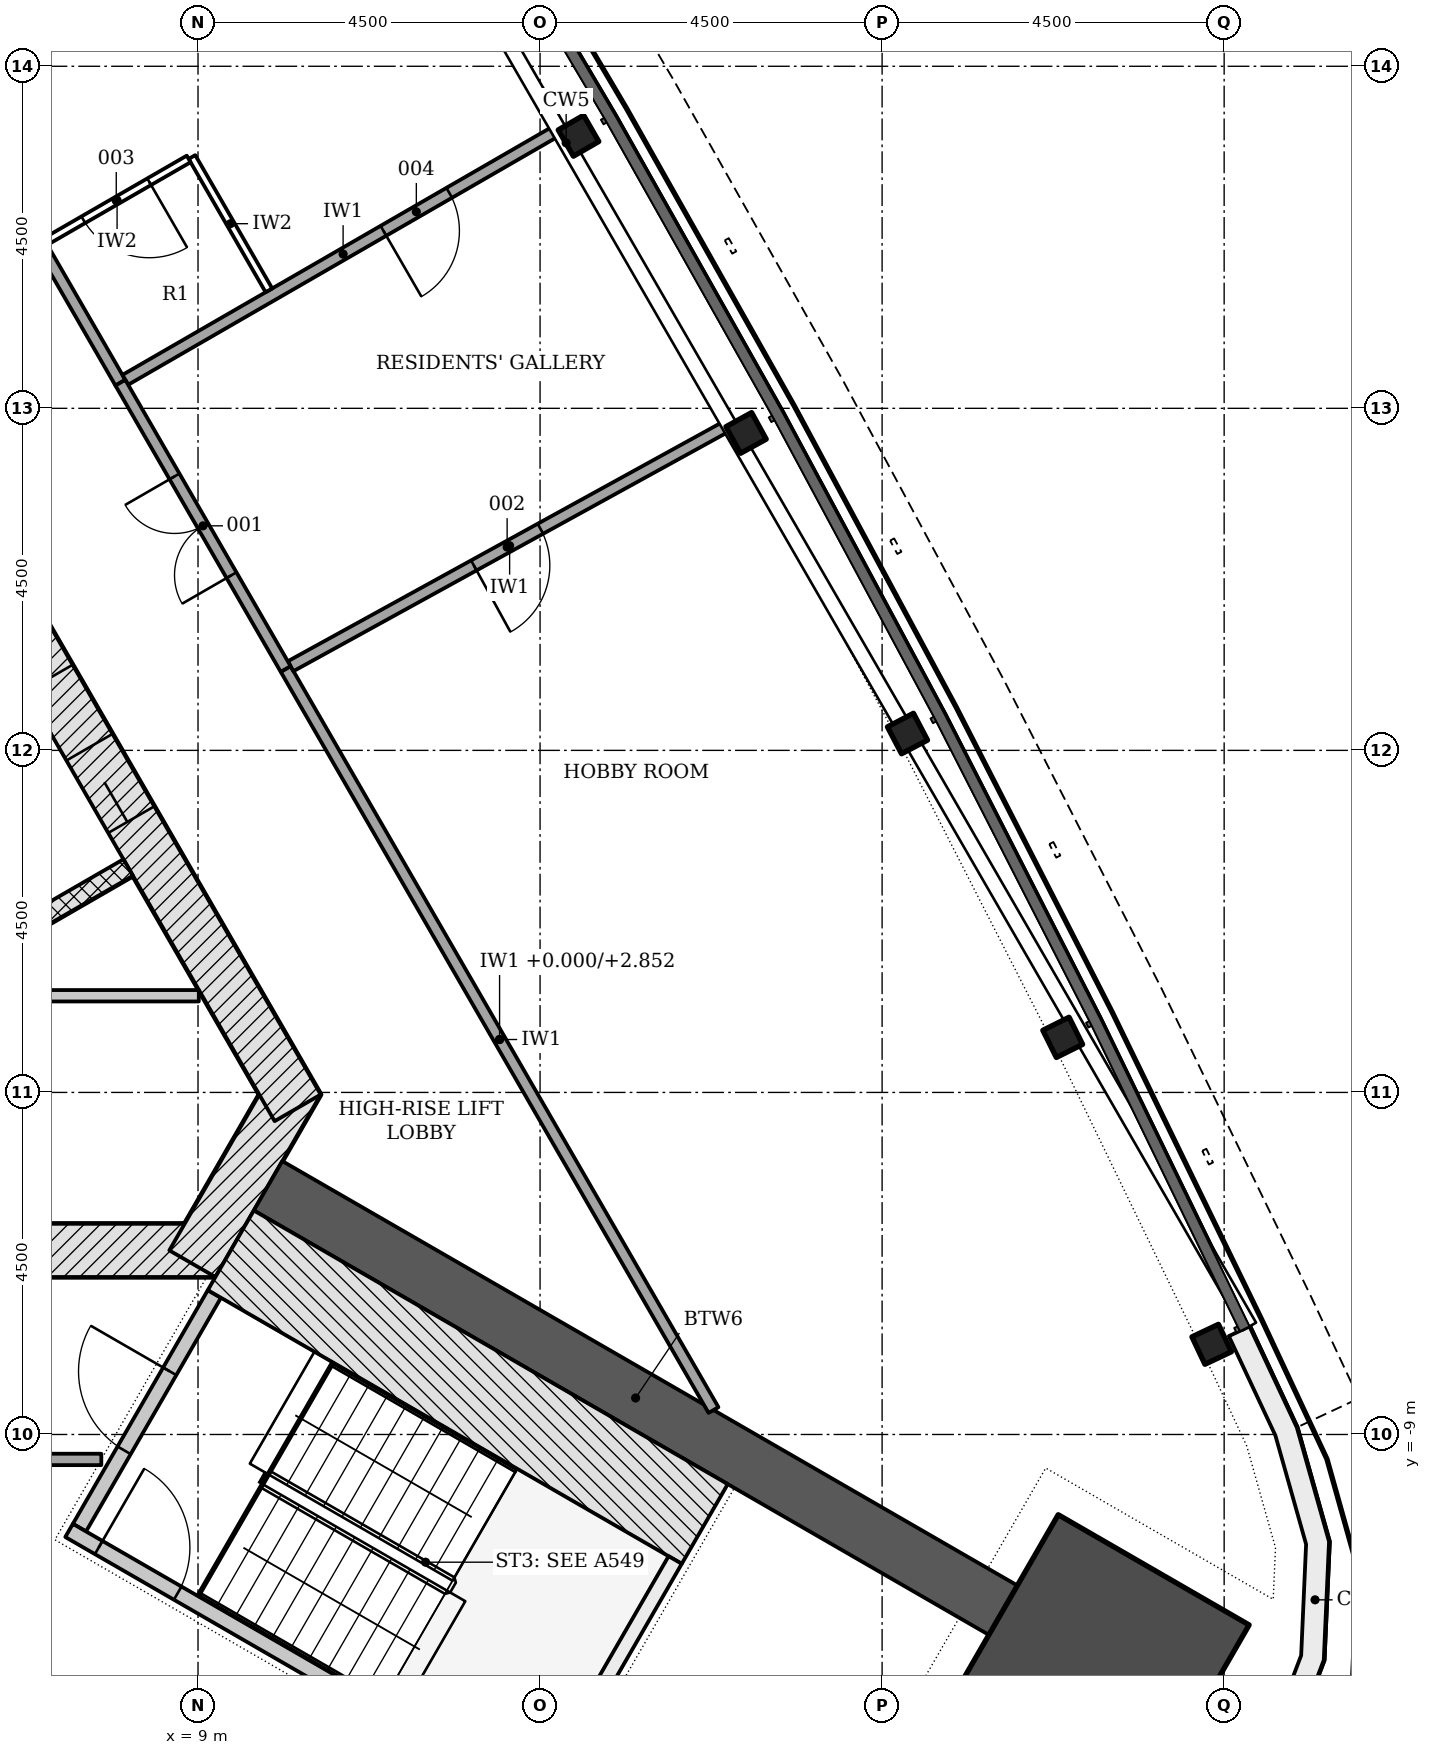
"""IFC4 building model, lengths in metres.
Left out: names, types, materials, properties, quantities, classifications, styles, units other than length and angle.
Written with IfcOpenShell. Run it as: python <this file> out.ifc"""

import sys

from ifc_helpers import new_model, si_unit, direction, frame, frame_2d, origin, origin_2d, place, context, subcontext, project, spatial, polyline, rectangle, i_section, outline, extrude, element, fill, save


model = new_model("IFC4")
c1 = context("Model", 3, precision=1e-05, world=origin(), true_north=direction((0.0, 1.0)))
c2 = subcontext(c1, "Body", "Model", "MODEL_VIEW")
j1 = project(units=[si_unit("LENGTHUNIT", "METRE"), si_unit("PLANEANGLEUNIT", "RADIAN")], contexts=[c1])
p1 = place(None, origin())
s1 = spatial("IfcSite", under=j1, at=p1, CompositionType="ELEMENT")
p2 = place(p1, origin())
s2 = spatial("IfcBuilding", under=s1, at=p2, CompositionType="ELEMENT")
p3 = place(p2, frame((0.0, 0.0, 140.1)))
s3 = spatial("IfcBuildingStorey", under=s2, at=p3, CompositionType="ELEMENT", Elevation=140.1)
p4 = place(p3, frame((-9.229, -6.578, -0.2), z_axis=(0.0, 0.0, 1.0), x_axis=(1.0, 0.0, 0.0)))
e1 = element("IfcWall", 1, at=p4, inside=s3, PredefinedType="SHEAR", context=c2, shape_type="SweptSolid", body=[
    extrude(rectangle(XDim=18.458, YDim=0.7, at=frame_2d((9.229, 0.0))), origin(), (0.0, 0.0, 1.0), 3.6),
])
p5 = place(p4, frame((8.7, 0.0, 0.2)))
e2 = element("IfcOpeningElement", 2, at=p5, cuts=e1, PredefinedType="OPENING", context=c2, shape_type="SweptSolid", body=[
    extrude(rectangle(XDim=1.0, YDim=2.1, at=frame_2d((0.5, 1.05))), frame((0.0, 0.36, 0.0), z_axis=(0.0, -1.0, 0.0), x_axis=(1.0, 0.0, 0.0)), (0.0, 0.0, 1.0), 0.72),
])
p6 = place(p4, frame((3.99, 0.0, 0.2)))
e3 = element("IfcOpeningElement", 3, at=p6, cuts=e1, PredefinedType="OPENING", context=c2, shape_type="SweptSolid", body=[
    extrude(rectangle(XDim=0.9, YDim=2.1, at=frame_2d((0.45, 1.05))), frame((0.0, 0.36, 0.0), z_axis=(0.0, -1.0, 0.0), x_axis=(1.0, 0.0, 0.0)), (0.0, 0.0, 1.0), 0.72),
])
p7 = place(p4, frame((13.489, 0.0, 0.2)))
e4 = element("IfcOpeningElement", 4, at=p7, cuts=e1, PredefinedType="OPENING", context=c2, shape_type="SweptSolid", body=[
    extrude(rectangle(XDim=1.0, YDim=2.1, at=frame_2d((0.5, 1.05))), frame((0.0, 0.36, 0.0), z_axis=(0.0, -1.0, 0.0), x_axis=(1.0, 0.0, 0.0)), (0.0, 0.0, 1.0), 0.72),
])
p8 = place(p3, frame((8.926, -6.753, -0.2), z_axis=(0.0, 0.0, 1.0), x_axis=(0.500042739161, 0.866000726912, 0.0)))
e5 = element("IfcWall", 5, at=p8, inside=s3, PredefinedType="SHEAR", context=c2, shape_type="SweptSolid", body=[
    extrude(rectangle(XDim=2.771, YDim=0.7, at=frame_2d((1.386, 0.0))), origin(), (0.0, 0.0, 1.0), 3.6),
])
p9 = place(p3, frame((10.311, -4.703, -0.2), z_axis=(0.0, 0.0, 1.0), x_axis=(-0.500001446645, 0.866024568562, 0.0)))
e6 = element("IfcWall", 6, at=p9, inside=s3, PredefinedType="SHEAR", context=c2, shape_type="SweptSolid", body=[
    extrude(rectangle(XDim=18.458, YDim=0.7, at=frame_2d((9.229, 0.0))), origin(), (0.0, 0.0, 1.0), 3.6),
])
p10 = place(p9, frame((4.379, 0.0, 0.2)))
e7 = element("IfcOpeningElement", 7, at=p10, cuts=e6, PredefinedType="OPENING", context=c2, shape_type="SweptSolid", body=[
    extrude(rectangle(XDim=1.1, YDim=2.1, at=frame_2d((0.55, 1.05))), frame((0.0, 0.36, 0.0), z_axis=(0.0, -1.0, 0.0), x_axis=(1.0, 0.0, 0.0)), (0.0, 0.0, 1.0), 0.72),
])
p11 = place(p9, frame((6.529, 0.0, 0.2)))
e8 = element("IfcOpeningElement", 8, at=p11, cuts=e6, PredefinedType="OPENING", context=c2, shape_type="SweptSolid", body=[
    extrude(rectangle(XDim=1.1, YDim=2.1, at=frame_2d((0.55, 1.05))), frame((0.0, 0.36, 0.0), z_axis=(0.0, -1.0, 0.0), x_axis=(1.0, 0.0, 0.0)), (0.0, 0.0, 1.0), 0.72),
])
p12 = place(p9, frame((8.679, 0.0, 0.2)))
e9 = element("IfcOpeningElement", 9, at=p12, cuts=e6, PredefinedType="OPENING", context=c2, shape_type="SweptSolid", body=[
    extrude(rectangle(XDim=1.1, YDim=2.1, at=frame_2d((0.55, 1.05))), frame((0.0, 0.36, 0.0), z_axis=(0.0, -1.0, 0.0), x_axis=(1.0, 0.0, 0.0)), (0.0, 0.0, 1.0), 0.72),
])
p13 = place(p9, frame((10.829, 0.0, 0.2)))
e10 = element("IfcOpeningElement", 10, at=p13, cuts=e6, PredefinedType="OPENING", context=c2, shape_type="SweptSolid", body=[
    extrude(rectangle(XDim=1.1, YDim=2.1, at=frame_2d((0.55, 1.05))), frame((0.0, 0.36, 0.0), z_axis=(0.0, -1.0, 0.0), x_axis=(1.0, 0.0, 0.0)), (0.0, 0.0, 1.0), 0.72),
])
p14 = place(p9, frame((12.979, 0.0, 0.2)))
e11 = element("IfcOpeningElement", 11, at=p14, cuts=e6, PredefinedType="OPENING", context=c2, shape_type="SweptSolid", body=[
    extrude(rectangle(XDim=1.1, YDim=2.1, at=frame_2d((0.55, 1.05))), frame((0.0, 0.36, 0.0), z_axis=(0.0, -1.0, 0.0), x_axis=(1.0, 0.0, 0.0)), (0.0, 0.0, 1.0), 0.72),
])
p15 = place(p3, frame((9.922, -5.728, -0.2), z_axis=(0.0, 0.0, 1.0), x_axis=(0.866023928423, -0.500002555393, 0.0)))
e12 = element("IfcWall", 12, at=p15, inside=s3, PredefinedType="SHEAR", context=c2, shape_type="SweptSolid", body=[
    extrude(rectangle(XDim=11.167, YDim=0.75, at=frame_2d((5.583, 0.0))), origin(), (0.0, 0.0, 1.0), 3.6),
])
p16 = place(p3, frame((20.848, -12.037, -0.2), z_axis=(0.0, 0.0, 1.0), x_axis=(0.866025403784, -0.5, 0.0)))
e13 = element("IfcColumn", 13, at=p16, inside=s3, PredefinedType="COLUMN", context=c2, shape_type="SweptSolid", body=[
    extrude(rectangle(XDim=2.9, YDim=2.9, at=origin_2d()), origin(), (0.0, 0.0, 1.0), 3.6),
])
for number, where, z_axis, x_axis in (
    (14, (22.336, -7.814, -0.2), (0.0, 0.0, 1.0), (-0.427, 0.904, 0.0)),
    (15, (20.376, -3.775, -0.2), (0.0, 0.0, 1.0), (-0.446, 0.895, 0.0)),
    (16, (18.334, 0.222, -0.2), (0.0, 0.0, 1.0), (-0.464, 0.886, 0.0)),
    (17, (16.21, 4.176, -0.2), (0.0, 0.0, 1.0), (-0.482, 0.876, 0.0)),
    (18, (14.006, 8.086, -0.2), (0.0, 0.0, 1.0), (-0.5, 0.866, 0.0)),
):
    element("IfcColumn", number, at=place(p3, frame(where, z_axis=z_axis, x_axis=x_axis)), inside=s3, PredefinedType="COLUMN", context=c2, shape_type="SweptSolid", body=[
        extrude(i_section(OverallWidth=0.399, OverallDepth=0.386, WebThickness=0.021, FlangeThickness=0.033, FilletRadius=0.015, at=origin_2d()), origin(), (0.0, 0.0, 1.0), 3.6),
    ])
p17 = place(p3, origin())
e19 = element("IfcWall", 19, at=p17, inside=s3, PredefinedType="NOTDEFINED", context=c2, shape_type="SweptSolid", body=[
    extrude(outline(polyline([(17.98, -15.985), (19.442, -15.86), (20.955, -15.476), (22.27, -14.636), (23.255, -13.427), (23.811, -11.968), (23.88, -10.409), (23.456, -8.907), (22.833, -7.579), (22.562, -7.706), (23.174, -9.012), (23.578, -10.444), (23.513, -11.906), (22.992, -13.275), (22.068, -14.41), (20.834, -15.197), (19.392, -15.563), (17.954, -15.686), (17.98, -15.985)])), origin(), (0.0, 0.0, 1.0), 3.3),
])
p18 = place(p3, frame((8.081, -1.541, -0.2), z_axis=(0.0, 0.0, 1.0), x_axis=(-0.866022959057, -0.500004234368, 0.0)))
e20 = element("IfcWall", 20, at=p18, inside=s3, PredefinedType="PARTITIONING", context=c2, shape_type="SweptSolid", body=[
    extrude(rectangle(XDim=2.5, YDim=0.25, at=frame_2d((1.25, 0.0))), origin(), (0.0, 0.0, 1.0), 3.6),
])
p19 = place(p3, frame((1.071, -3.228, 0.0), z_axis=(0.0, 0.0, 1.0), x_axis=(1.0, 0.0, 0.0)))
e21 = element("IfcWall", 21, at=p19, inside=s3, PredefinedType="PARTITIONING", context=c2, shape_type="SweptSolid", body=[
    extrude(rectangle(XDim=7.939, YDim=0.15, at=frame_2d((3.97, 0.0))), origin(), (0.0, 0.0, 1.0), 3.4),
])
p20 = place(p3, frame((7.44, -10.226, -0.2), z_axis=(0.0, 0.0, 1.0), x_axis=(0.500022077904, 0.866012656725, 0.0)))
e22 = element("IfcWall", 22, at=p20, inside=s3, PredefinedType="SHEAR", context=c2, shape_type="SweptSolid", body=[
    extrude(rectangle(XDim=3.55, YDim=0.2, at=frame_2d((1.775, 0.0))), origin(), (0.0, 0.0, 1.0), 3.6),
])
p21 = place(p20, frame((1.175, 0.0, 0.2)))
e23 = element("IfcOpeningElement", 23, at=p21, cuts=e22, PredefinedType="OPENING", context=c2, shape_type="SweptSolid", body=[
    extrude(rectangle(XDim=1.2, YDim=2.1, at=frame_2d((0.6, 1.05))), frame((0.0, 0.11, 0.0), z_axis=(0.0, -1.0, 0.0), x_axis=(1.0, 0.0, 0.0)), (0.0, 0.0, 1.0), 0.22),
])
p22 = place(p3, frame((7.304, -10.262, -0.2), z_axis=(0.0, 0.0, 1.0), x_axis=(0.866026594901, -0.49999793692, 0.0)))
e24 = element("IfcWall", 24, at=p22, inside=s3, PredefinedType="SHEAR", context=c2, shape_type="SweptSolid", body=[
    extrude(rectangle(XDim=5.6, YDim=0.2, at=frame_2d((2.8, 0.0))), origin(), (0.0, 0.0, 1.0), 3.6),
])
p23 = place(p22, frame((0.45, 0.0, 0.2)))
e25 = element("IfcOpeningElement", 25, at=p23, cuts=e24, PredefinedType="OPENING", context=c2, shape_type="SweptSolid", body=[
    extrude(rectangle(XDim=1.2, YDim=2.1, at=frame_2d((0.6, 1.05))), frame((0.0, 0.11, 0.0), z_axis=(0.0, -1.0, 0.0), x_axis=(1.0, 0.0, 0.0)), (0.0, 0.0, 1.0), 0.22),
])
p24 = place(p3, frame((9.431, -6.577, -0.2), z_axis=(0.0, 0.0, 1.0), x_axis=(0.866018442252, -0.500012057535, 0.0)))
e26 = element("IfcWall", 26, at=p24, inside=s3, PredefinedType="SHEAR", context=c2, shape_type="SweptSolid", body=[
    extrude(rectangle(XDim=7.2, YDim=1.211, at=frame_2d((3.6, 0.0))), origin(), (0.0, 0.0, 1.0), 3.6),
])
p25 = place(p3, frame((0.0, 0.0, -0.2)))
e27 = element("IfcWall", 27, at=p25, inside=s3, PredefinedType="SHEAR", context=c2, shape_type="SweptSolid", body=[
    extrude(outline(polyline([(12.104, -13.149), (14.289, -12.563), (15.364, -10.701), (15.191, -10.601), (14.157, -12.392), (12.132, -12.934), (12.204, -12.976), (12.204, -12.976), (12.204, -12.976), (12.204, -12.976), (12.204, -12.976), (12.204, -12.976), (12.204, -12.976), (12.204, -12.976), (12.204, -12.976), (12.204, -12.976), (12.204, -12.976), (12.204, -12.976), (12.204, -12.976), (12.204, -12.976), (12.204, -12.976), (12.204, -12.976), (12.204, -12.976), (12.104, -13.149)])), origin(), (0.0, 0.0, 1.0), 3.6),
])
p26 = place(p3, frame((15.782, -8.679, 0.0), z_axis=(0.0, 0.0, 1.0), x_axis=(-0.500008408626, 0.866020549008, 0.0)))
e28 = element("IfcWall", 28, at=p26, inside=s3, PredefinedType="PARTITIONING", context=c2, shape_type="SweptSolid", body=[
    extrude(rectangle(XDim=11.258, YDim=0.15, at=frame_2d((5.629, 0.0))), origin(), (0.0, 0.0, 1.0), 2.852),
])
p27 = place(p3, frame((7.979, 4.837, 0.0), z_axis=(0.0, 0.0, 1.0), x_axis=(-0.500014427086, 0.866017074142, 0.0)))
e29 = element("IfcWall", 29, at=p27, inside=s3, PredefinedType="PARTITIONING", context=c2, shape_type="SweptSolid", body=[
    extrude(rectangle(XDim=7.528, YDim=0.15, at=frame_2d((3.764, 0.0))), origin(), (0.0, 0.0, 1.0), 2.847),
])
p28 = place(p3, frame((15.98, 4.278, 0.0), z_axis=(0.0, 0.0, 1.0), x_axis=(-0.876090474863, -0.482146740997, 0.0)))
e30 = element("IfcWall", 30, at=p28, inside=s3, PredefinedType="PARTITIONING", context=c2, shape_type="SweptSolid", body=[
    extrude(rectangle(XDim=6.577, YDim=0.15, at=frame_2d((3.288, 0.0))), origin(), (0.0, 0.0, 1.0), 3.4),
])
p29 = place(p28, frame((2.826, 0.0, 0.0)))
e31 = element("IfcOpeningElement", 31, at=p29, cuts=e30, PredefinedType="OPENING", context=c2, shape_type="SweptSolid", body=[
    extrude(rectangle(XDim=1.0, YDim=2.1, at=frame_2d((0.5, 1.05))), frame((0.0, 0.085, 0.0), z_axis=(0.0, -1.0, 0.0), x_axis=(1.0, 0.0, 0.0)), (0.0, 0.0, 1.0), 0.17),
])
p30 = place(p3, frame((13.774, 8.183, 0.0), z_axis=(0.0, 0.0, 1.0), x_axis=(-0.866027686223, -0.499996046679, 0.0)))
e32 = element("IfcWall", 32, at=p30, inside=s3, PredefinedType="PARTITIONING", context=c2, shape_type="SweptSolid", body=[
    extrude(rectangle(XDim=6.617, YDim=0.15, at=frame_2d((3.309, 0.0))), origin(), (0.0, 0.0, 1.0), 3.4),
])
p31 = place(p30, frame((1.696, 0.0, 0.0)))
e33 = element("IfcOpeningElement", 33, at=p31, cuts=e32, PredefinedType="OPENING", context=c2, shape_type="SweptSolid", body=[
    extrude(rectangle(XDim=1.0, YDim=2.1, at=frame_2d((0.5, 1.05))), frame((0.0, 0.085, 0.0), z_axis=(0.0, -1.0, 0.0), x_axis=(1.0, 0.0, 0.0)), (0.0, 0.0, 1.0), 0.17),
])
p32 = place(p3, frame((10.153, 1.071, 0.0), z_axis=(0.0, 0.0, 1.0), x_axis=(-0.499967049188, 0.866044427109, 0.0)))
e34 = element("IfcWall", 34, at=p32, inside=s3, PredefinedType="PARTITIONING", context=c2, shape_type="SweptSolid", body=[
    extrude(rectangle(XDim=4.349, YDim=0.15, at=frame_2d((2.174, 0.0))), origin(), (0.0, 0.0, 1.0), 2.847),
])
p33 = place(p32, frame((1.425, 0.0, 0.0)))
e35 = element("IfcOpeningElement", 35, at=p33, cuts=e34, PredefinedType="OPENING", context=c2, shape_type="SweptSolid", body=[
    extrude(rectangle(XDim=1.5, YDim=2.1, at=frame_2d((0.75, 1.05))), frame((0.0, 0.085, 0.0), z_axis=(0.0, -1.0, 0.0), x_axis=(1.0, 0.0, 0.0)), (0.0, 0.0, 1.0), 0.17),
])
p34 = place(p3, frame((9.933, 6.052, 0.0), z_axis=(0.0, 0.0, 1.0), x_axis=(-0.499990325971, 0.866030989016, 0.0)))
e36 = element("IfcWall", 36, at=p34, inside=s3, PredefinedType="PARTITIONING", context=c2, shape_type="SweptSolid", body=[
    extrude(rectangle(XDim=2.025, YDim=0.1, at=frame_2d((1.012, 0.0))), origin(), (0.0, 0.0, 1.0), 3.4),
])
p35 = place(p3, frame((8.877, 7.781, 0.0), z_axis=(0.0, 0.0, 1.0), x_axis=(-0.865989304205, -0.500062521093, 0.0)))
e37 = element("IfcWall", 37, at=p35, inside=s3, PredefinedType="PARTITIONING", context=c2, shape_type="SweptSolid", body=[
    extrude(rectangle(XDim=2.175, YDim=0.1, at=frame_2d((1.087, 0.0))), origin(), (0.0, 0.0, 1.0), 3.4),
])
p36 = place(p35, frame((0.6, 0.0, 0.0)))
e38 = element("IfcOpeningElement", 38, at=p36, cuts=e37, PredefinedType="OPENING", context=c2, shape_type="SweptSolid", body=[
    extrude(rectangle(XDim=1.0, YDim=2.1, at=frame_2d((0.5, 1.05))), frame((0.0, 0.06, 0.0), z_axis=(0.0, -1.0, 0.0), x_axis=(1.0, 0.0, 0.0)), (0.0, 0.0, 1.0), 0.12),
])
p37 = place(p3, frame((-4.149, -9.328, 0.0), z_axis=(0.0, 0.0, 1.0), x_axis=(1.0, 0.0, 0.0)))
e39 = element("IfcWall", 39, at=p37, inside=s3, PredefinedType="PARTITIONING", context=c2, shape_type="SweptSolid", body=[
    extrude(rectangle(XDim=11.876, YDim=0.15, at=frame_2d((5.938, 0.0))), origin(), (0.0, 0.0, 1.0), 2.847),
])
p38 = place(p37, frame((1.699, 0.0, 0.0)))
e40 = element("IfcOpeningElement", 40, at=p38, cuts=e39, PredefinedType="OPENING", context=c2, shape_type="SweptSolid", body=[
    extrude(rectangle(XDim=1.0, YDim=2.1, at=frame_2d((0.5, 1.05))), frame((0.0, 0.085, 0.0), z_axis=(0.0, -1.0, 0.0), x_axis=(1.0, 0.0, 0.0)), (0.0, 0.0, 1.0), 0.17),
])
p39 = place(p37, frame((8.663, 0.0, 0.0)))
e41 = element("IfcOpeningElement", 41, at=p39, cuts=e39, PredefinedType="OPENING", context=c2, shape_type="SweptSolid", body=[
    extrude(rectangle(XDim=1.0, YDim=2.1, at=frame_2d((0.5, 1.05))), frame((0.0, 0.085, 0.0), z_axis=(0.0, -1.0, 0.0), x_axis=(1.0, 0.0, 0.0)), (0.0, 0.0, 1.0), 0.17),
])
p40 = place(p10, origin())
e42 = element("IfcDoor", 42, at=p40, inside=s3, OperationType="DOUBLE_DOOR_SLIDING", PredefinedType="DOOR", context=c2, shape_type="SweptSolid", body=[
    extrude(rectangle(XDim=1.1, YDim=2.1, at=frame_2d((0.55, 1.05))), frame((0.0, 0.025, 0.0), z_axis=(0.0, -1.0, 0.0), x_axis=(1.0, 0.0, 0.0)), (0.0, 0.0, 1.0), 0.05),
])
fill(e7, e42)
p41 = place(p21, origin())
e43 = element("IfcDoor", 43, at=p41, inside=s3, OperationType="SINGLE_SWING_RIGHT", PredefinedType="DOOR", context=c2, shape_type="SweptSolid", body=[
    extrude(rectangle(XDim=1.2, YDim=2.1, at=frame_2d((0.6, 1.05))), frame((0.0, 0.025, 0.0), z_axis=(0.0, -1.0, 0.0), x_axis=(1.0, 0.0, 0.0)), (0.0, 0.0, 1.0), 0.05),
])
fill(e23, e43)
p42 = place(p23, origin())
e44 = element("IfcDoor", 44, at=p42, inside=s3, OperationType="SINGLE_SWING_LEFT", PredefinedType="DOOR", context=c2, shape_type="SweptSolid", body=[
    extrude(rectangle(XDim=1.2, YDim=2.1, at=frame_2d((0.6, 1.05))), frame((0.0, 0.025, 0.0), z_axis=(0.0, -1.0, 0.0), x_axis=(1.0, 0.0, 0.0)), (0.0, 0.0, 1.0), 0.05),
])
fill(e25, e44)
p43 = place(p33, origin())
e45 = element("IfcDoor", 45, at=p43, inside=s3, OperationType="DOUBLE_DOOR_SINGLE_SWING", PredefinedType="DOOR", context=c2, shape_type="SweptSolid", body=[
    extrude(rectangle(XDim=1.5, YDim=2.1, at=frame_2d((0.75, 1.05))), frame((0.0, 0.025, 0.0), z_axis=(0.0, -1.0, 0.0), x_axis=(1.0, 0.0, 0.0)), (0.0, 0.0, 1.0), 0.05),
])
fill(e35, e45)
p44 = place(p29, origin())
e46 = element("IfcDoor", 46, at=p44, inside=s3, OperationType="SINGLE_SWING_RIGHT", PredefinedType="DOOR", context=c2, shape_type="SweptSolid", body=[
    extrude(rectangle(XDim=1.0, YDim=2.1, at=frame_2d((0.5, 1.05))), frame((0.0, 0.025, 0.0), z_axis=(0.0, -1.0, 0.0), x_axis=(1.0, 0.0, 0.0)), (0.0, 0.0, 1.0), 0.05),
])
fill(e31, e46)
p45 = place(p36, origin())
e47 = element("IfcDoor", 47, at=p45, inside=s3, OperationType="SINGLE_SWING_LEFT", PredefinedType="DOOR", context=c2, shape_type="SweptSolid", body=[
    extrude(rectangle(XDim=1.0, YDim=2.1, at=frame_2d((0.5, 1.05))), frame((0.0, 0.025, 0.0), z_axis=(0.0, -1.0, 0.0), x_axis=(1.0, 0.0, 0.0)), (0.0, 0.0, 1.0), 0.05),
])
fill(e38, e47)
p46 = place(p31, origin())
e48 = element("IfcDoor", 48, at=p46, inside=s3, OperationType="SINGLE_SWING_RIGHT", PredefinedType="DOOR", context=c2, shape_type="SweptSolid", body=[
    extrude(rectangle(XDim=1.0, YDim=2.1, at=frame_2d((0.5, 1.05))), frame((0.0, 0.025, 0.0), z_axis=(0.0, -1.0, 0.0), x_axis=(1.0, 0.0, 0.0)), (0.0, 0.0, 1.0), 0.05),
])
fill(e33, e48)
save(model, sys.argv[1])
